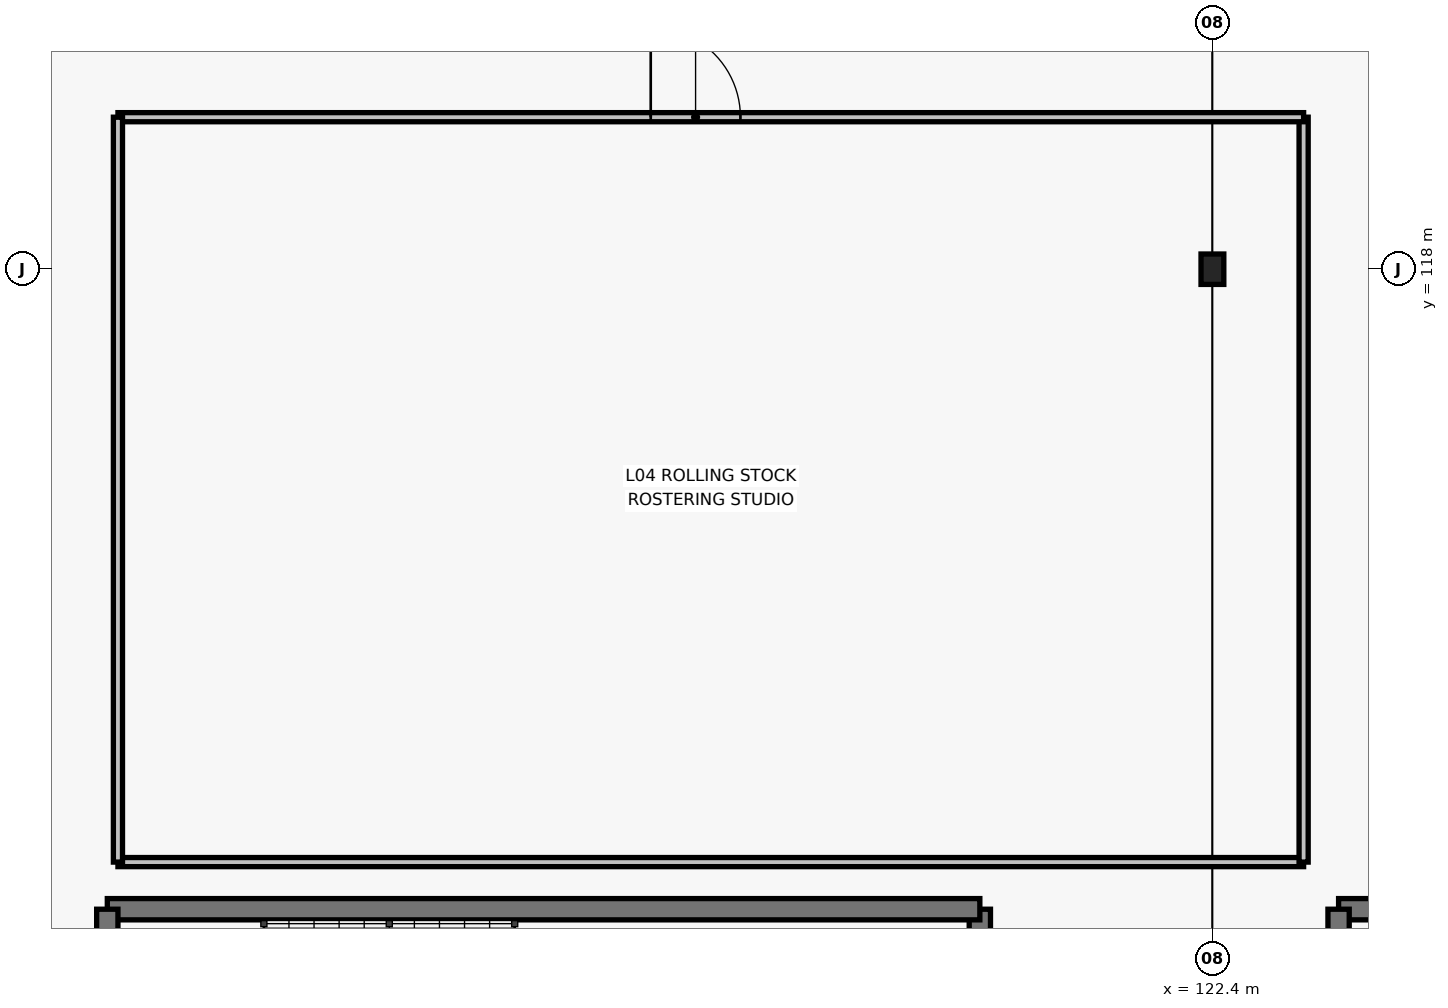
"""IFC4 building model, lengths in metres.
Left out: names, types, materials, properties, quantities, classifications, styles, units other than length and angle.
Written with IfcOpenShell. Run it as: python <this file> out.ifc"""

import sys

from ifc_helpers import new_model, si_unit, direction, frame, frame_2d, origin, origin_2d, place, context, subcontext, project, spatial, rectangle, i_section, extrude, element, fill, save


model = new_model("IFC4")
c1 = context("Model", 3, precision=1e-05, world=origin(), true_north=direction((0.0, 1.0)))
c2 = subcontext(c1, "Body", "Model", "MODEL_VIEW")
j1 = project(units=[si_unit("LENGTHUNIT", "METRE"), si_unit("PLANEANGLEUNIT", "RADIAN")], contexts=[c1])
p1 = place(None, origin())
s1 = spatial("IfcSite", under=j1, at=p1, CompositionType="ELEMENT")
p2 = place(p1, origin())
s2 = spatial("IfcBuilding", under=s1, at=p2, CompositionType="ELEMENT")
p3 = place(p2, frame((0.0, 0.0, 21.0)))
s3 = spatial("IfcBuildingStorey", under=s2, at=p3, CompositionType="ELEMENT", Elevation=21.0)
p4 = place(p3, frame((122.4, 118.0, 0.0), z_axis=(0.0, 0.0, 1.0), x_axis=(1.0, 0.0, 0.0)))
e1 = element("IfcColumn", 1, at=p4, inside=s3, PredefinedType="COLUMN", context=c2, shape_type="SweptSolid", body=[
    extrude(i_section(OverallWidth=0.3, OverallDepth=0.4, WebThickness=0.013, FlangeThickness=0.024, FilletRadius=0.027, at=origin_2d()), origin(), (0.0, 0.0, 1.0), 3.9),
])
p5 = place(p3, frame((119.34, 105.26, 0.0), z_axis=(0.0, 0.0, 1.0), x_axis=(0.0, 1.0, 0.0)))
e2 = element("IfcWall", 2, at=p5, inside=s3, PredefinedType="SHEAR", context=c2, shape_type="SweptSolid", body=[
    extrude(rectangle(XDim=4.32, YDim=0.28, at=frame_2d((2.16, 0.0))), origin(), (0.0, 0.0, 1.0), 3.71),
])
p6 = place(p3, frame((119.34, 109.58, 0.0), z_axis=(0.0, 0.0, 1.0), x_axis=(-1.0, 0.0, 0.0)))
e3 = element("IfcWall", 3, at=p6, inside=s3, PredefinedType="SHEAR", context=c2, shape_type="SweptSolid", body=[
    extrude(rectangle(XDim=11.48, YDim=0.28, at=frame_2d((5.74, 0.0))), origin(), (0.0, 0.0, 1.0), 3.71),
])
p7 = place(p3, frame((107.86, 109.58, 0.0), z_axis=(0.0, 0.0, 1.0), x_axis=(0.0, -1.0, 0.0)))
e4 = element("IfcWall", 4, at=p7, inside=s3, PredefinedType="SHEAR", context=c2, shape_type="SweptSolid", body=[
    extrude(rectangle(XDim=4.32, YDim=0.28, at=frame_2d((2.16, 0.0))), origin(), (0.0, 0.0, 1.0), 3.71),
])
p8 = place(p7, frame((1.585, 0.0, 0.0)))
e5 = element("IfcOpeningElement", 5, at=p8, cuts=e4, PredefinedType="OPENING", context=c2, shape_type="SweptSolid", body=[
    extrude(rectangle(XDim=1.15, YDim=2.2, at=frame_2d((0.575, 1.1))), frame((0.0, 0.15, 0.0), z_axis=(0.0, -1.0, 0.0), x_axis=(1.0, 0.0, 0.0)), (0.0, 0.0, 1.0), 0.3),
])
p9 = place(p3, frame((135.54, 109.58, 0.0), z_axis=(0.0, 0.0, 1.0), x_axis=(-1.0, 0.0, 0.0)))
e6 = element("IfcWall", 6, at=p9, inside=s3, PredefinedType="SHEAR", context=c2, shape_type="SweptSolid", body=[
    extrude(rectangle(XDim=11.48, YDim=0.28, at=frame_2d((5.74, 0.0))), origin(), (0.0, 0.0, 1.0), 3.71),
])
p10 = place(p3, frame((124.06, 109.58, 0.0), z_axis=(0.0, 0.0, 1.0), x_axis=(0.0, -1.0, 0.0)))
e7 = element("IfcWall", 7, at=p10, inside=s3, PredefinedType="SHEAR", context=c2, shape_type="SweptSolid", body=[
    extrude(rectangle(XDim=4.32, YDim=0.28, at=frame_2d((2.16, 0.0))), origin(), (0.0, 0.0, 1.0), 3.71),
])
p11 = place(p10, frame((1.585, 0.0, 0.0)))
e8 = element("IfcOpeningElement", 8, at=p11, cuts=e7, PredefinedType="OPENING", context=c2, shape_type="SweptSolid", body=[
    extrude(rectangle(XDim=1.15, YDim=2.2, at=frame_2d((0.575, 1.1))), frame((0.0, 0.15, 0.0), z_axis=(0.0, -1.0, 0.0), x_axis=(1.0, 0.0, 0.0)), (0.0, 0.0, 1.0), 0.3),
])
p12 = place(p3, frame((108.0, 110.2, 0.0), z_axis=(0.0, 0.0, 1.0), x_axis=(1.0, 0.0, 0.0)))
e9 = element("IfcWall", 9, at=p12, inside=s3, PredefinedType="PARTITIONING", context=c2, shape_type="SweptSolid", body=[
    extrude(rectangle(XDim=15.6, YDim=0.12, at=frame_2d((7.8, 0.0))), origin(), (0.0, 0.0, 1.0), 3.71),
])
p13 = place(p3, frame((123.6, 110.2, 0.0), z_axis=(0.0, 0.0, 1.0), x_axis=(0.0, 1.0, 0.0)))
e10 = element("IfcWall", 10, at=p13, inside=s3, PredefinedType="PARTITIONING", context=c2, shape_type="SweptSolid", body=[
    extrude(rectangle(XDim=9.8, YDim=0.12, at=frame_2d((4.9, 0.0))), origin(), (0.0, 0.0, 1.0), 3.71),
])
p14 = place(p3, frame((123.6, 120.0, 0.0), z_axis=(0.0, 0.0, 1.0), x_axis=(-1.0, 0.0, 0.0)))
e11 = element("IfcWall", 11, at=p14, inside=s3, PredefinedType="PARTITIONING", context=c2, shape_type="SweptSolid", body=[
    extrude(rectangle(XDim=15.6, YDim=0.12, at=frame_2d((7.8, 0.0))), origin(), (0.0, 0.0, 1.0), 3.71),
])
p15 = place(p14, frame((7.41, 0.0, 0.0)))
e12 = element("IfcOpeningElement", 12, at=p15, cuts=e11, PredefinedType="OPENING", context=c2, shape_type="SweptSolid", body=[
    extrude(rectangle(XDim=1.18, YDim=2.18, at=frame_2d((0.59, 1.09))), frame((0.0, 0.07, 0.0), z_axis=(0.0, -1.0, 0.0), x_axis=(1.0, 0.0, 0.0)), (0.0, 0.0, 1.0), 0.14),
])
p16 = place(p3, frame((108.0, 120.0, 0.0), z_axis=(0.0, 0.0, 1.0), x_axis=(0.0, -1.0, 0.0)))
e13 = element("IfcWall", 13, at=p16, inside=s3, PredefinedType="PARTITIONING", context=c2, shape_type="SweptSolid", body=[
    extrude(rectangle(XDim=9.8, YDim=0.12, at=frame_2d((4.9, 0.0))), origin(), (0.0, 0.0, 1.0), 3.71),
])
p17 = place(p15, origin())
e14 = element("IfcDoor", 14, at=p17, inside=s3, OperationType="SINGLE_SWING_RIGHT", PredefinedType="DOOR", context=c2, shape_type="SweptSolid", body=[
    extrude(rectangle(XDim=1.18, YDim=2.18, at=frame_2d((0.59, 1.09))), frame((0.0, 0.025, 0.0), z_axis=(0.0, -1.0, 0.0), x_axis=(1.0, 0.0, 0.0)), (0.0, 0.0, 1.0), 0.05),
])
fill(e12, e14)
save(model, sys.argv[1])
